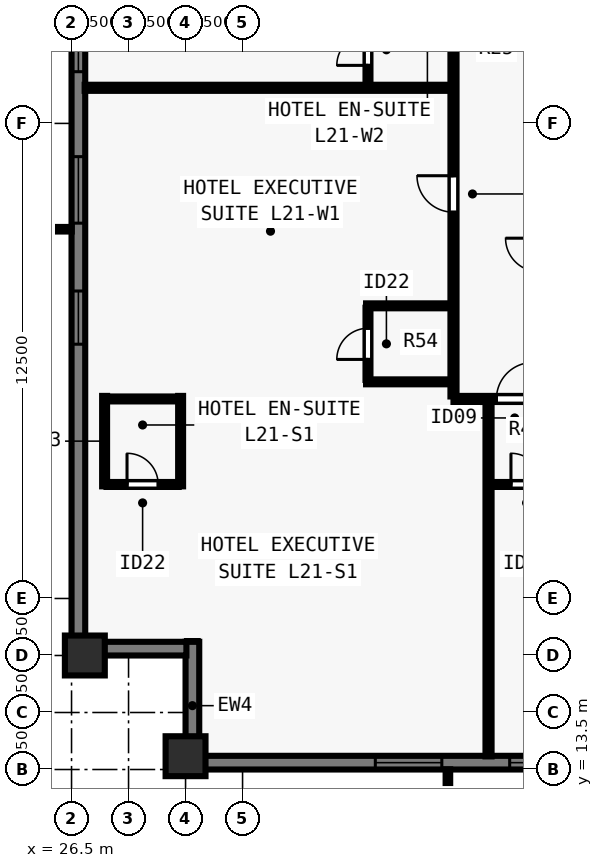
"""IFC4 building model, lengths in metres.
Left out: names, types, materials, properties, quantities, classifications, styles, units other than length and angle.
Written with IfcOpenShell. Run it as: python <this file> out.ifc"""

import sys

from ifc_helpers import new_model, si_unit, direction, frame, frame_2d, origin, origin_2d, place, context, subcontext, project, spatial, rectangle, extrude, element, fill, save


model = new_model("IFC4")
c1 = context("Model", 3, precision=1e-05, world=origin(), true_north=direction((0.0, 1.0)))
c2 = subcontext(c1, "Body", "Model", "MODEL_VIEW")
j1 = project(units=[si_unit("LENGTHUNIT", "METRE"), si_unit("PLANEANGLEUNIT", "RADIAN")], contexts=[c1])
p1 = place(None, origin())
s1 = spatial("IfcSite", under=j1, at=p1, CompositionType="ELEMENT")
p2 = place(p1, origin())
s2 = spatial("IfcBuilding", under=s1, at=p2, CompositionType="ELEMENT")
p3 = place(p2, frame((0.0, 0.0, 79.5)))
s3 = spatial("IfcBuildingStorey", under=s2, at=p3, CompositionType="ELEMENT", Elevation=79.5)
for number, where, z_axis, x_axis in (
    (1, (29.5, 13.85, 0.0), (0.0, 0.0, 1.0), (1.0, 0.0, 0.0)),
    (2, (26.85, 16.5, 0.0), (0.0, 0.0, 1.0), (0.0, 1.0, 0.0)),
):
    element("IfcColumn", number, at=place(p3, frame(where, z_axis=z_axis, x_axis=x_axis)), inside=s3, PredefinedType="COLUMN", context=c2, shape_type="SweptSolid", body=[
        extrude(rectangle(XDim=1.05, YDim=1.05, at=origin_2d()), origin(), (0.0, 0.0, 1.0), 3.5),
    ])
p4 = place(p3, frame((74.5, 13.68, 0.0), z_axis=(0.0, 0.0, 1.0), x_axis=(-1.0, 0.0, 0.0)))
e3 = element("IfcWall", 3, at=p4, inside=s3, PredefinedType="SOLIDWALL", context=c2, shape_type="SweptSolid", body=[
    extrude(rectangle(XDim=44.662, YDim=0.36, at=frame_2d((22.331, 0.0))), origin(), (0.0, 0.0, 1.0), 3.28),
])
p5 = place(p4, frame((4.655, 0.0, 0.8)))
e4 = element("IfcOpeningElement", 4, at=p5, cuts=e3, PredefinedType="OPENING", context=c2, shape_type="SweptSolid", body=[
    extrude(rectangle(XDim=1.75, YDim=1.544, at=frame_2d((0.875, 0.772))), frame((0.0, 0.19, 0.0), z_axis=(0.0, -1.0, 0.0), x_axis=(1.0, 0.0, 0.0)), (0.0, 0.0, 1.0), 0.38),
])
p6 = place(p4, frame((8.19, 0.0, 0.8)))
e5 = element("IfcOpeningElement", 5, at=p6, cuts=e3, PredefinedType="OPENING", context=c2, shape_type="SweptSolid", body=[
    extrude(rectangle(XDim=1.4, YDim=1.544, at=frame_2d((0.7, 0.772))), frame((0.0, 0.19, 0.0), z_axis=(0.0, -1.0, 0.0), x_axis=(1.0, 0.0, 0.0)), (0.0, 0.0, 1.0), 0.38),
])
p7 = place(p4, frame((11.375, 0.0, 0.8)))
e6 = element("IfcOpeningElement", 6, at=p7, cuts=e3, PredefinedType="OPENING", context=c2, shape_type="SweptSolid", body=[
    extrude(rectangle(XDim=1.75, YDim=1.544, at=frame_2d((0.875, 0.772))), frame((0.0, 0.19, 0.0), z_axis=(0.0, -1.0, 0.0), x_axis=(1.0, 0.0, 0.0)), (0.0, 0.0, 1.0), 0.38),
])
p8 = place(p4, frame((14.911, 0.0, 0.8)))
e7 = element("IfcOpeningElement", 7, at=p8, cuts=e3, PredefinedType="OPENING", context=c2, shape_type="SweptSolid", body=[
    extrude(rectangle(XDim=1.4, YDim=1.544, at=frame_2d((0.7, 0.772))), frame((0.0, 0.19, 0.0), z_axis=(0.0, -1.0, 0.0), x_axis=(1.0, 0.0, 0.0)), (0.0, 0.0, 1.0), 0.38),
])
p9 = place(p4, frame((18.546, 0.0, 0.8)))
e8 = element("IfcOpeningElement", 8, at=p9, cuts=e3, PredefinedType="OPENING", context=c2, shape_type="SweptSolid", body=[
    extrude(rectangle(XDim=1.75, YDim=1.544, at=frame_2d((0.875, 0.772))), frame((0.0, 0.19, 0.0), z_axis=(0.0, -1.0, 0.0), x_axis=(1.0, 0.0, 0.0)), (0.0, 0.0, 1.0), 0.38),
])
p10 = place(p4, frame((21.631, 0.0, 0.8)))
e9 = element("IfcOpeningElement", 9, at=p10, cuts=e3, PredefinedType="OPENING", context=c2, shape_type="SweptSolid", body=[
    extrude(rectangle(XDim=1.4, YDim=1.544, at=frame_2d((0.7, 0.772))), frame((0.0, 0.19, 0.0), z_axis=(0.0, -1.0, 0.0), x_axis=(1.0, 0.0, 0.0)), (0.0, 0.0, 1.0), 0.38),
])
p11 = place(p4, frame((24.366, 0.0, 0.8)))
e10 = element("IfcOpeningElement", 10, at=p11, cuts=e3, PredefinedType="OPENING", context=c2, shape_type="SweptSolid", body=[
    extrude(rectangle(XDim=1.75, YDim=1.544, at=frame_2d((0.875, 0.772))), frame((0.0, 0.19, 0.0), z_axis=(0.0, -1.0, 0.0), x_axis=(1.0, 0.0, 0.0)), (0.0, 0.0, 1.0), 0.38),
])
p12 = place(p4, frame((28.351, 0.0, 0.8)))
e11 = element("IfcOpeningElement", 11, at=p12, cuts=e3, PredefinedType="OPENING", context=c2, shape_type="SweptSolid", body=[
    extrude(rectangle(XDim=1.4, YDim=1.544, at=frame_2d((0.7, 0.772))), frame((0.0, 0.19, 0.0), z_axis=(0.0, -1.0, 0.0), x_axis=(1.0, 0.0, 0.0)), (0.0, 0.0, 1.0), 0.38),
])
p13 = place(p4, frame((31.537, 0.0, 0.8)))
e12 = element("IfcOpeningElement", 12, at=p13, cuts=e3, PredefinedType="OPENING", context=c2, shape_type="SweptSolid", body=[
    extrude(rectangle(XDim=1.75, YDim=1.544, at=frame_2d((0.875, 0.772))), frame((0.0, 0.19, 0.0), z_axis=(0.0, -1.0, 0.0), x_axis=(1.0, 0.0, 0.0)), (0.0, 0.0, 1.0), 0.38),
])
p14 = place(p4, frame((35.072, 0.0, 0.8)))
e13 = element("IfcOpeningElement", 13, at=p14, cuts=e3, PredefinedType="OPENING", context=c2, shape_type="SweptSolid", body=[
    extrude(rectangle(XDim=1.4, YDim=1.544, at=frame_2d((0.7, 0.772))), frame((0.0, 0.19, 0.0), z_axis=(0.0, -1.0, 0.0), x_axis=(1.0, 0.0, 0.0)), (0.0, 0.0, 1.0), 0.38),
])
p15 = place(p4, frame((38.257, 0.0, 0.8)))
e14 = element("IfcOpeningElement", 14, at=p15, cuts=e3, PredefinedType="OPENING", context=c2, shape_type="SweptSolid", body=[
    extrude(rectangle(XDim=1.75, YDim=1.544, at=frame_2d((0.875, 0.772))), frame((0.0, 0.19, 0.0), z_axis=(0.0, -1.0, 0.0), x_axis=(1.0, 0.0, 0.0)), (0.0, 0.0, 1.0), 0.38),
])
p16 = place(p3, frame((29.68, 13.5, 0.0), z_axis=(0.0, 0.0, 1.0), x_axis=(0.0, 1.0, 0.0)))
e15 = element("IfcWall", 15, at=p16, inside=s3, PredefinedType="SOLIDWALL", context=c2, shape_type="SweptSolid", body=[
    extrude(rectangle(XDim=3.36, YDim=0.36, at=frame_2d((1.68, 0.0))), origin(), (0.0, 0.0, 1.0), 3.28),
])
p17 = place(p3, frame((29.522, 16.68, 0.0), z_axis=(0.0, 0.0, 1.0), x_axis=(-1.0, 0.0, 0.0)))
e16 = element("IfcWall", 16, at=p17, inside=s3, PredefinedType="SOLIDWALL", context=c2, shape_type="SweptSolid", body=[
    extrude(rectangle(XDim=2.684, YDim=0.36, at=frame_2d((1.342, 0.0))), origin(), (0.0, 0.0, 1.0), 3.28),
])
p18 = place(p3, frame((26.68, 16.5, 0.0), z_axis=(0.0, 0.0, 1.0), x_axis=(0.0, 1.0, 0.0)))
e17 = element("IfcWall", 17, at=p18, inside=s3, PredefinedType="SOLIDWALL", context=c2, shape_type="SweptSolid", body=[
    extrude(rectangle(XDim=44.662, YDim=0.36, at=frame_2d((22.331, 0.0))), origin(), (0.0, 0.0, 1.0), 3.28),
])
p19 = place(p18, frame((8.19, 0.0, 0.8)))
e18 = element("IfcOpeningElement", 18, at=p19, cuts=e17, PredefinedType="OPENING", context=c2, shape_type="SweptSolid", body=[
    extrude(rectangle(XDim=1.4, YDim=1.544, at=frame_2d((0.7, 0.772))), frame((0.0, 0.19, 0.0), z_axis=(0.0, -1.0, 0.0), x_axis=(1.0, 0.0, 0.0)), (0.0, 0.0, 1.0), 0.38),
])
p20 = place(p18, frame((11.375, 0.0, 0.8)))
e19 = element("IfcOpeningElement", 19, at=p20, cuts=e17, PredefinedType="OPENING", context=c2, shape_type="SweptSolid", body=[
    extrude(rectangle(XDim=1.75, YDim=1.544, at=frame_2d((0.875, 0.772))), frame((0.0, 0.19, 0.0), z_axis=(0.0, -1.0, 0.0), x_axis=(1.0, 0.0, 0.0)), (0.0, 0.0, 1.0), 0.38),
])
p21 = place(p18, frame((15.361, 0.0, 0.8)))
e20 = element("IfcOpeningElement", 20, at=p21, cuts=e17, PredefinedType="OPENING", context=c2, shape_type="SweptSolid", body=[
    extrude(rectangle(XDim=1.4, YDim=1.544, at=frame_2d((0.7, 0.772))), frame((0.0, 0.19, 0.0), z_axis=(0.0, -1.0, 0.0), x_axis=(1.0, 0.0, 0.0)), (0.0, 0.0, 1.0), 0.38),
])
p22 = place(p18, frame((18.546, 0.0, 0.8)))
e21 = element("IfcOpeningElement", 21, at=p22, cuts=e17, PredefinedType="OPENING", context=c2, shape_type="SweptSolid", body=[
    extrude(rectangle(XDim=1.75, YDim=1.544, at=frame_2d((0.875, 0.772))), frame((0.0, 0.19, 0.0), z_axis=(0.0, -1.0, 0.0), x_axis=(1.0, 0.0, 0.0)), (0.0, 0.0, 1.0), 0.38),
])
p23 = place(p18, frame((22.881, 0.0, 0.8)))
e22 = element("IfcOpeningElement", 22, at=p23, cuts=e17, PredefinedType="OPENING", context=c2, shape_type="SweptSolid", body=[
    extrude(rectangle(XDim=1.4, YDim=1.544, at=frame_2d((0.7, 0.772))), frame((0.0, 0.19, 0.0), z_axis=(0.0, -1.0, 0.0), x_axis=(1.0, 0.0, 0.0)), (0.0, 0.0, 1.0), 0.38),
])
p24 = place(p18, frame((28.351, 0.0, 0.8)))
e23 = element("IfcOpeningElement", 23, at=p24, cuts=e17, PredefinedType="OPENING", context=c2, shape_type="SweptSolid", body=[
    extrude(rectangle(XDim=1.4, YDim=1.544, at=frame_2d((0.7, 0.772))), frame((0.0, 0.19, 0.0), z_axis=(0.0, -1.0, 0.0), x_axis=(1.0, 0.0, 0.0)), (0.0, 0.0, 1.0), 0.38),
])
p25 = place(p18, frame((31.537, 0.0, 0.8)))
e24 = element("IfcOpeningElement", 24, at=p25, cuts=e17, PredefinedType="OPENING", context=c2, shape_type="SweptSolid", body=[
    extrude(rectangle(XDim=1.75, YDim=1.544, at=frame_2d((0.875, 0.772))), frame((0.0, 0.19, 0.0), z_axis=(0.0, -1.0, 0.0), x_axis=(1.0, 0.0, 0.0)), (0.0, 0.0, 1.0), 0.38),
])
p26 = place(p18, frame((35.072, 0.0, 0.8)))
e25 = element("IfcOpeningElement", 25, at=p26, cuts=e17, PredefinedType="OPENING", context=c2, shape_type="SweptSolid", body=[
    extrude(rectangle(XDim=1.4, YDim=1.544, at=frame_2d((0.7, 0.772))), frame((0.0, 0.19, 0.0), z_axis=(0.0, -1.0, 0.0), x_axis=(1.0, 0.0, 0.0)), (0.0, 0.0, 1.0), 0.38),
])
p27 = place(p3, frame((36.55, 23.25, 0.0), z_axis=(0.0, 0.0, 1.0), x_axis=(1.0, 0.0, 0.0)))
e26 = element("IfcWall", 26, at=p27, inside=s3, PredefinedType="PARTITIONING", context=c2, shape_type="SweptSolid", body=[
    extrude(rectangle(XDim=30.9, YDim=0.16, at=frame_2d((15.45, 0.0))), origin(), (0.0, 0.0, 1.0), 3.28),
])
p28 = place(p27, frame((1.13, 0.0, 0.0)))
e27 = element("IfcOpeningElement", 27, at=p28, cuts=e26, PredefinedType="OPENING", context=c2, shape_type="SweptSolid", body=[
    extrude(rectangle(XDim=0.96, YDim=2.15, at=frame_2d((0.48, 1.075))), frame((0.0, 0.09, 0.0), z_axis=(0.0, -1.0, 0.0), x_axis=(1.0, 0.0, 0.0)), (0.0, 0.0, 1.0), 0.18),
])
p29 = place(p27, frame((6.093, 0.0, 0.0)))
e28 = element("IfcOpeningElement", 28, at=p29, cuts=e26, PredefinedType="OPENING", context=c2, shape_type="SweptSolid", body=[
    extrude(rectangle(XDim=0.96, YDim=2.15, at=frame_2d((0.48, 1.075))), frame((0.0, 0.09, 0.0), z_axis=(0.0, -1.0, 0.0), x_axis=(1.0, 0.0, 0.0)), (0.0, 0.0, 1.0), 0.18),
])
p30 = place(p27, frame((16.125, 0.0, 0.0)))
e29 = element("IfcOpeningElement", 29, at=p30, cuts=e26, PredefinedType="OPENING", context=c2, shape_type="SweptSolid", body=[
    extrude(rectangle(XDim=0.96, YDim=2.15, at=frame_2d((0.48, 1.075))), frame((0.0, 0.09, 0.0), z_axis=(0.0, -1.0, 0.0), x_axis=(1.0, 0.0, 0.0)), (0.0, 0.0, 1.0), 0.18),
])
p31 = place(p27, frame((26.157, 0.0, 0.0)))
e30 = element("IfcOpeningElement", 30, at=p31, cuts=e26, PredefinedType="OPENING", context=c2, shape_type="SweptSolid", body=[
    extrude(rectangle(XDim=0.96, YDim=2.15, at=frame_2d((0.48, 1.075))), frame((0.0, 0.09, 0.0), z_axis=(0.0, -1.0, 0.0), x_axis=(1.0, 0.0, 0.0)), (0.0, 0.0, 1.0), 0.18),
])
p32 = place(p27, frame((28.92, 0.0, 0.0)))
e31 = element("IfcOpeningElement", 31, at=p32, cuts=e26, PredefinedType="OPENING", context=c2, shape_type="SweptSolid", body=[
    extrude(rectangle(XDim=0.96, YDim=2.15, at=frame_2d((0.48, 1.075))), frame((0.0, 0.09, 0.0), z_axis=(0.0, -1.0, 0.0), x_axis=(1.0, 0.0, 0.0)), (0.0, 0.0, 1.0), 0.18),
])
p33 = place(p3, frame((36.55, 23.315, 0.0), z_axis=(0.0, 0.0, 1.0), x_axis=(0.0, 1.0, 0.0)))
e32 = element("IfcWall", 32, at=p33, inside=s3, PredefinedType="PARTITIONING", context=c2, shape_type="SweptSolid", body=[
    extrude(rectangle(XDim=31.37, YDim=0.16, at=frame_2d((15.685, 0.0))), origin(), (0.0, 0.0, 1.0), 3.28),
])
p34 = place(p33, frame((4.848, 0.0, 0.0)))
e33 = element("IfcOpeningElement", 33, at=p34, cuts=e32, PredefinedType="OPENING", context=c2, shape_type="SweptSolid", body=[
    extrude(rectangle(XDim=0.96, YDim=2.15, at=frame_2d((0.48, 1.075))), frame((0.0, 0.09, 0.0), z_axis=(0.0, -1.0, 0.0), x_axis=(1.0, 0.0, 0.0)), (0.0, 0.0, 1.0), 0.18),
])
p35 = place(p33, frame((12.39, 0.0, 0.0)))
e34 = element("IfcOpeningElement", 34, at=p35, cuts=e32, PredefinedType="OPENING", context=c2, shape_type="SweptSolid", body=[
    extrude(rectangle(XDim=0.96, YDim=2.15, at=frame_2d((0.48, 1.075))), frame((0.0, 0.09, 0.0), z_axis=(0.0, -1.0, 0.0), x_axis=(1.0, 0.0, 0.0)), (0.0, 0.0, 1.0), 0.18),
])
p36 = place(p33, frame((20.265, 0.0, 0.0)))
e35 = element("IfcOpeningElement", 35, at=p36, cuts=e32, PredefinedType="OPENING", context=c2, shape_type="SweptSolid", body=[
    extrude(rectangle(XDim=0.96, YDim=2.15, at=frame_2d((0.48, 1.075))), frame((0.0, 0.09, 0.0), z_axis=(0.0, -1.0, 0.0), x_axis=(1.0, 0.0, 0.0)), (0.0, 0.0, 1.0), 0.18),
])
p37 = place(p33, frame((28.223, 0.0, 0.0)))
e36 = element("IfcOpeningElement", 36, at=p37, cuts=e32, PredefinedType="OPENING", context=c2, shape_type="SweptSolid", body=[
    extrude(rectangle(XDim=0.96, YDim=2.15, at=frame_2d((0.48, 1.075))), frame((0.0, 0.09, 0.0), z_axis=(0.0, -1.0, 0.0), x_axis=(1.0, 0.0, 0.0)), (0.0, 0.0, 1.0), 0.18),
])
for number, where, z_axis, x_axis in (
    (37, (27.37, 20.95, 0.0), (0.0, 0.0, 1.0), (0.0, 1.0, 0.0)),
    (38, (29.37, 20.95, 0.0), (0.0, 0.0, 1.0), (0.0, 1.0, 0.0)),
):
    element("IfcWall", number, at=place(p3, frame(where, z_axis=z_axis, x_axis=x_axis)), inside=s3, PredefinedType="PLUMBINGWALL", context=c2, shape_type="SweptSolid", body=[
        extrude(rectangle(XDim=2.38, YDim=0.13, at=frame_2d((1.19, 0.0))), origin(), (0.0, 0.0, 1.0), 3.28),
    ])
p38 = place(p3, frame((27.42, 21.0, 0.0), z_axis=(0.0, 0.0, 1.0), x_axis=(1.0, 0.0, 0.0)))
e39 = element("IfcWall", 39, at=p38, inside=s3, PredefinedType="PLUMBINGWALL", context=c2, shape_type="SweptSolid", body=[
    extrude(rectangle(XDim=1.9, YDim=0.13, at=frame_2d((0.95, 0.0))), origin(), (0.0, 0.0, 1.0), 3.28),
])
p39 = place(p38, frame((0.54, 0.0, 0.0)))
e40 = element("IfcOpeningElement", 40, at=p39, cuts=e39, PredefinedType="OPENING", context=c2, shape_type="SweptSolid", body=[
    extrude(rectangle(XDim=0.82, YDim=2.1, at=frame_2d((0.41, 1.05))), frame((0.0, 0.075, 0.0), z_axis=(0.0, -1.0, 0.0), x_axis=(1.0, 0.0, 0.0)), (0.0, 0.0, 1.0), 0.15),
])
p40 = place(p3, frame((27.42, 23.25, 0.0), z_axis=(0.0, 0.0, 1.0), x_axis=(1.0, 0.0, 0.0)))
e41 = element("IfcWall", 41, at=p40, inside=s3, PredefinedType="PLUMBINGWALL", context=c2, shape_type="SweptSolid", body=[
    extrude(rectangle(XDim=1.9, YDim=0.13, at=frame_2d((0.95, 0.0))), origin(), (0.0, 0.0, 1.0), 3.28),
])
p41 = place(p3, frame((37.472, 13.845, 0.0), z_axis=(0.0, 0.0, 1.0), x_axis=(0.0, 1.0, 0.0)))
e42 = element("IfcWall", 42, at=p41, inside=s3, PredefinedType="PARTITIONING", context=c2, shape_type="SweptSolid", body=[
    extrude(rectangle(XDim=9.34, YDim=0.16, at=frame_2d((4.67, 0.0))), origin(), (0.0, 0.0, 1.0), 3.28),
])
p42 = place(p3, frame((37.537, 21.0, 0.0), z_axis=(0.0, 0.0, 1.0), x_axis=(1.0, 0.0, 0.0)))
e43 = element("IfcWall", 43, at=p42, inside=s3, PredefinedType="PLUMBINGWALL", context=c2, shape_type="SweptSolid", body=[
    extrude(rectangle(XDim=1.885, YDim=0.13, at=frame_2d((0.942, 0.0))), origin(), (0.0, 0.0, 1.0), 3.28),
])
p43 = place(p42, frame((0.525, 0.0, 0.0)))
e44 = element("IfcOpeningElement", 44, at=p43, cuts=e43, PredefinedType="OPENING", context=c2, shape_type="SweptSolid", body=[
    extrude(rectangle(XDim=0.82, YDim=2.1, at=frame_2d((0.41, 1.05))), frame((0.0, 0.075, 0.0), z_axis=(0.0, -1.0, 0.0), x_axis=(1.0, 0.0, 0.0)), (0.0, 0.0, 1.0), 0.15),
])
p44 = place(p3, frame((34.25, 23.7, 0.0), z_axis=(0.0, 0.0, 1.0), x_axis=(1.0, 0.0, 0.0)))
e45 = element("IfcWall", 45, at=p44, inside=s3, PredefinedType="PLUMBINGWALL", context=c2, shape_type="SweptSolid", body=[
    extrude(rectangle(XDim=2.235, YDim=0.13, at=frame_2d((1.118, 0.0))), origin(), (0.0, 0.0, 1.0), 2.849),
])
p45 = place(p3, frame((34.25, 25.7, 0.0), z_axis=(0.0, 0.0, 1.0), x_axis=(1.0, 0.0, 0.0)))
e46 = element("IfcWall", 46, at=p45, inside=s3, PredefinedType="PLUMBINGWALL", context=c2, shape_type="SweptSolid", body=[
    extrude(rectangle(XDim=2.235, YDim=0.13, at=frame_2d((1.118, 0.0))), origin(), (0.0, 0.0, 1.0), 3.28),
])
p46 = place(p3, frame((34.3, 23.75, 0.0), z_axis=(0.0, 0.0, 1.0), x_axis=(0.0, 1.0, 0.0)))
e47 = element("IfcWall", 47, at=p46, inside=s3, PredefinedType="PLUMBINGWALL", context=c2, shape_type="SweptSolid", body=[
    extrude(rectangle(XDim=1.9, YDim=0.13, at=frame_2d((0.95, 0.0))), origin(), (0.0, 0.0, 1.0), 3.28),
])
p47 = place(p46, frame((0.54, 0.0, 0.0)))
e48 = element("IfcOpeningElement", 48, at=p47, cuts=e47, PredefinedType="OPENING", context=c2, shape_type="SweptSolid", body=[
    extrude(rectangle(XDim=0.82, YDim=2.1, at=frame_2d((0.41, 1.05))), frame((0.0, 0.075, 0.0), z_axis=(0.0, -1.0, 0.0), x_axis=(1.0, 0.0, 0.0)), (0.0, 0.0, 1.0), 0.15),
])
p48 = place(p3, frame((26.845, 31.437, 0.0), z_axis=(0.0, 0.0, 1.0), x_axis=(1.0, 0.0, 0.0)))
e49 = element("IfcWall", 49, at=p48, inside=s3, PredefinedType="PARTITIONING", context=c2, shape_type="SweptSolid", body=[
    extrude(rectangle(XDim=9.64, YDim=0.16, at=frame_2d((4.82, 0.0))), origin(), (0.0, 0.0, 1.0), 3.28),
])
p49 = place(p3, frame((34.3, 31.502, 0.0), z_axis=(0.0, 0.0, 1.0), x_axis=(0.0, 1.0, 0.0)))
e50 = element("IfcWall", 50, at=p49, inside=s3, PredefinedType="PLUMBINGWALL", context=c2, shape_type="SweptSolid", body=[
    extrude(rectangle(XDim=1.885, YDim=0.13, at=frame_2d((0.942, 0.0))), origin(), (0.0, 0.0, 1.0), 3.28),
])
p50 = place(p49, frame((0.525, 0.0, 0.0)))
e51 = element("IfcOpeningElement", 51, at=p50, cuts=e50, PredefinedType="OPENING", context=c2, shape_type="SweptSolid", body=[
    extrude(rectangle(XDim=0.82, YDim=2.1, at=frame_2d((0.41, 1.05))), frame((0.0, 0.075, 0.0), z_axis=(0.0, -1.0, 0.0), x_axis=(1.0, 0.0, 0.0)), (0.0, 0.0, 1.0), 0.15),
])
p51 = place(p14, origin())
e52 = element("IfcWindow", 52, at=p51, inside=s3, PartitioningType="SINGLE_PANEL", PredefinedType="WINDOW", context=c2, shape_type="SweptSolid", body=[
    extrude(rectangle(XDim=1.4, YDim=1.544, at=frame_2d((0.7, 0.772))), frame((0.0, -0.05, 0.0), z_axis=(0.0, -1.0, 0.0), x_axis=(1.0, 0.0, 0.0)), (0.0, 0.0, 1.0), 0.06),
])
fill(e13, e52)
p52 = place(p15, origin())
e53 = element("IfcWindow", 53, at=p52, inside=s3, PartitioningType="SINGLE_PANEL", PredefinedType="WINDOW", context=c2, shape_type="SweptSolid", body=[
    extrude(rectangle(XDim=1.75, YDim=1.544, at=frame_2d((0.875, 0.772))), frame((0.0, -0.05, 0.0), z_axis=(0.0, -1.0, 0.0), x_axis=(1.0, 0.0, 0.0)), (0.0, 0.0, 1.0), 0.06),
])
fill(e14, e53)
p53 = place(p19, origin())
e54 = element("IfcWindow", 54, at=p53, inside=s3, PartitioningType="SINGLE_PANEL", PredefinedType="WINDOW", context=c2, shape_type="SweptSolid", body=[
    extrude(rectangle(XDim=1.4, YDim=1.544, at=frame_2d((0.7, 0.772))), frame((0.0, -0.05, 0.0), z_axis=(0.0, -1.0, 0.0), x_axis=(1.0, 0.0, 0.0)), (0.0, 0.0, 1.0), 0.06),
])
fill(e18, e54)
p54 = place(p20, origin())
e55 = element("IfcWindow", 55, at=p54, inside=s3, PartitioningType="SINGLE_PANEL", PredefinedType="WINDOW", context=c2, shape_type="SweptSolid", body=[
    extrude(rectangle(XDim=1.75, YDim=1.544, at=frame_2d((0.875, 0.772))), frame((0.0, -0.05, 0.0), z_axis=(0.0, -1.0, 0.0), x_axis=(1.0, 0.0, 0.0)), (0.0, 0.0, 1.0), 0.06),
])
fill(e19, e55)
p55 = place(p21, origin())
e56 = element("IfcWindow", 56, at=p55, inside=s3, PartitioningType="SINGLE_PANEL", PredefinedType="WINDOW", context=c2, shape_type="SweptSolid", body=[
    extrude(rectangle(XDim=1.4, YDim=1.544, at=frame_2d((0.7, 0.772))), frame((0.0, -0.05, 0.0), z_axis=(0.0, -1.0, 0.0), x_axis=(1.0, 0.0, 0.0)), (0.0, 0.0, 1.0), 0.06),
])
fill(e20, e56)
p56 = place(p39, origin())
e57 = element("IfcDoor", 57, at=p56, inside=s3, OperationType="SINGLE_SWING_LEFT", PredefinedType="DOOR", context=c2, shape_type="SweptSolid", body=[
    extrude(rectangle(XDim=0.82, YDim=2.1, at=frame_2d((0.41, 1.05))), frame((0.0, 0.025, 0.0), z_axis=(0.0, -1.0, 0.0), x_axis=(1.0, 0.0, 0.0)), (0.0, 0.0, 1.0), 0.05),
])
fill(e40, e57)
p57 = place(p28, origin())
e58 = element("IfcDoor", 58, at=p57, inside=s3, OperationType="SINGLE_SWING_RIGHT", PredefinedType="DOOR", context=c2, shape_type="SweptSolid", body=[
    extrude(rectangle(XDim=0.96, YDim=2.15, at=frame_2d((0.48, 1.075))), frame((0.0, 0.025, 0.0), z_axis=(0.0, -1.0, 0.0), x_axis=(1.0, 0.0, 0.0)), (0.0, 0.0, 1.0), 0.05),
])
fill(e27, e58)
p58 = place(p43, origin())
e59 = element("IfcDoor", 59, at=p58, inside=s3, OperationType="SINGLE_SWING_LEFT", PredefinedType="DOOR", context=c2, shape_type="SweptSolid", body=[
    extrude(rectangle(XDim=0.82, YDim=2.1, at=frame_2d((0.41, 1.05))), frame((0.0, 0.025, 0.0), z_axis=(0.0, -1.0, 0.0), x_axis=(1.0, 0.0, 0.0)), (0.0, 0.0, 1.0), 0.05),
])
fill(e44, e59)
p59 = place(p47, origin())
e60 = element("IfcDoor", 60, at=p59, inside=s3, OperationType="SINGLE_SWING_LEFT", PredefinedType="DOOR", context=c2, shape_type="SweptSolid", body=[
    extrude(rectangle(XDim=0.82, YDim=2.1, at=frame_2d((0.41, 1.05))), frame((0.0, 0.025, 0.0), z_axis=(0.0, -1.0, 0.0), x_axis=(1.0, 0.0, 0.0)), (0.0, 0.0, 1.0), 0.05),
])
fill(e48, e60)
p60 = place(p34, origin())
e61 = element("IfcDoor", 61, at=p60, inside=s3, OperationType="SINGLE_SWING_RIGHT", PredefinedType="DOOR", context=c2, shape_type="SweptSolid", body=[
    extrude(rectangle(XDim=0.96, YDim=2.15, at=frame_2d((0.48, 1.075))), frame((0.0, 0.025, 0.0), z_axis=(0.0, -1.0, 0.0), x_axis=(1.0, 0.0, 0.0)), (0.0, 0.0, 1.0), 0.05),
])
fill(e33, e61)
p61 = place(p50, origin())
e62 = element("IfcDoor", 62, at=p61, inside=s3, OperationType="SINGLE_SWING_LEFT", PredefinedType="DOOR", context=c2, shape_type="SweptSolid", body=[
    extrude(rectangle(XDim=0.82, YDim=2.1, at=frame_2d((0.41, 1.05))), frame((0.0, 0.025, 0.0), z_axis=(0.0, -1.0, 0.0), x_axis=(1.0, 0.0, 0.0)), (0.0, 0.0, 1.0), 0.05),
])
fill(e51, e62)
save(model, sys.argv[1])
